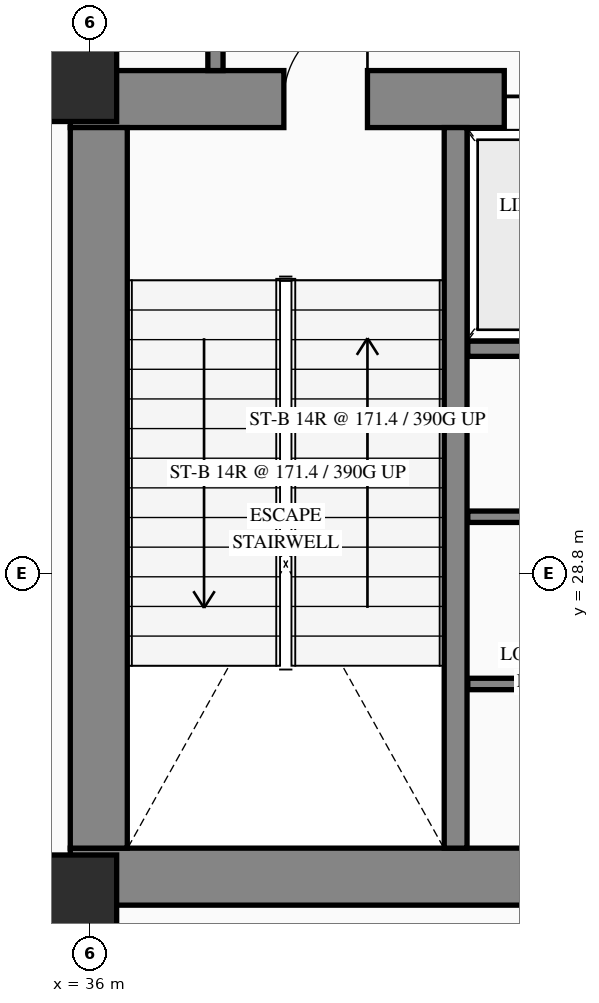
"""IFC4 building model, lengths in metres.
Left out: names, types, materials, properties, quantities, classifications, styles, units other than length and angle.
Written with IfcOpenShell. Run it as: python <this file> out.ifc"""

import sys

from ifc_helpers import new_model, si_unit, direction, frame, frame_2d, origin, origin_2d, place, context, subcontext, project, spatial, rectangle, extrude, element, fill, save


model = new_model("IFC4")
c1 = context("Model", 3, precision=1e-05, world=origin(), true_north=direction((0.0, 1.0)))
c2 = subcontext(c1, "Body", "Model", "MODEL_VIEW")
j1 = project(units=[si_unit("LENGTHUNIT", "METRE"), si_unit("PLANEANGLEUNIT", "RADIAN")], contexts=[c1])
p1 = place(None, origin())
s1 = spatial("IfcSite", under=j1, at=p1, CompositionType="ELEMENT")
p2 = place(p1, origin())
s2 = spatial("IfcBuilding", under=s1, at=p2, CompositionType="ELEMENT")
p3 = place(p2, frame((0.0, 0.0, -4.8)))
s3 = spatial("IfcBuildingStorey", under=s2, at=p3, CompositionType="ELEMENT", Elevation=-4.8)
p4 = place(p3, frame((35.74, 24.815, 0.0), z_axis=(0.0, 0.0, 1.0), x_axis=(1.0, 0.0, 0.0)))
e1 = element("IfcWall", 1, at=p4, inside=s3, PredefinedType="SHEAR", context=c2, shape_type="SweptSolid", body=[
    extrude(rectangle(XDim=8.06, YDim=0.75, at=frame_2d((4.03, 0.0))), origin(), (0.0, 0.0, 1.0), 4.8),
])
p5 = place(p3, frame((35.74, 35.045, 0.0), z_axis=(0.0, 0.0, 1.0), x_axis=(1.0, 0.0, 0.0)))
e2 = element("IfcWall", 2, at=p5, inside=s3, PredefinedType="SHEAR", context=c2, shape_type="SweptSolid", body=[
    extrude(rectangle(XDim=8.06, YDim=0.75, at=frame_2d((4.03, 0.0))), origin(), (0.0, 0.0, 1.0), 4.8),
])
p6 = place(p5, frame((2.81, 0.0, 0.0)))
e3 = element("IfcOpeningElement", 3, at=p6, cuts=e2, PredefinedType="OPENING", context=c2, shape_type="SweptSolid", body=[
    extrude(rectangle(XDim=1.1, YDim=2.2, at=frame_2d((0.55, 1.1))), frame((0.0, 0.385, 0.0), z_axis=(0.0, -1.0, 0.0), x_axis=(1.0, 0.0, 0.0)), (0.0, 0.0, 1.0), 0.77),
])
p7 = place(p5, frame((5.71, 0.0, 0.0)))
e4 = element("IfcOpeningElement", 4, at=p7, cuts=e2, PredefinedType="OPENING", context=c2, shape_type="SweptSolid", body=[
    extrude(rectangle(XDim=1.12, YDim=2.15, at=frame_2d((0.56, 1.075))), frame((0.0, 0.385, 0.0), z_axis=(0.0, -1.0, 0.0), x_axis=(1.0, 0.0, 0.0)), (0.0, 0.0, 1.0), 0.77),
])
p8 = place(p3, frame((36.115, 25.19, 0.0), z_axis=(0.0, 0.0, 1.0), x_axis=(0.0, 1.0, 0.0)))
e5 = element("IfcWall", 5, at=p8, inside=s3, PredefinedType="SHEAR", context=c2, shape_type="SweptSolid", body=[
    extrude(rectangle(XDim=9.48, YDim=0.75, at=frame_2d((4.74, 0.0))), origin(), (0.0, 0.0, 1.0), 4.8),
])
p9 = place(p3, frame((40.81, 25.19, 0.0), z_axis=(0.0, 0.0, 1.0), x_axis=(0.0, 1.0, 0.0)))
e6 = element("IfcWall", 6, at=p9, inside=s3, PredefinedType="SHEAR", context=c2, shape_type="SweptSolid", body=[
    extrude(rectangle(XDim=9.48, YDim=0.3, at=frame_2d((4.74, 0.0))), origin(), (0.0, 0.0, 1.0), 4.8),
])
for number, where, z_axis, x_axis in (
    (7, (35.8, 24.55, 0.0), (0.0, 0.0, 1.0), (1.0, 0.0, 0.0)),
    (8, (35.8, 35.3, 0.0), (0.0, 0.0, 1.0), (1.0, 0.0, 0.0)),
):
    element("IfcColumn", number, at=place(p3, frame(where, z_axis=z_axis, x_axis=x_axis)), inside=s3, PredefinedType="COLUMN", context=c2, shape_type="SweptSolid", body=[
        extrude(rectangle(XDim=1.1, YDim=1.1, at=origin_2d()), origin(), (0.0, 0.0, 1.0), 4.8),
    ])
p10 = place(p3, frame((40.97, 31.76, 0.0), z_axis=(0.0, 0.0, 1.0), x_axis=(1.0, 0.0, 0.0)))
e9 = element("IfcWall", 9, at=p10, inside=s3, PredefinedType="STANDARD", context=c2, shape_type="SweptSolid", body=[
    extrude(rectangle(XDim=2.08, YDim=0.2, at=frame_2d((1.04, 0.0))), origin(), (0.0, 0.0, 1.0), 4.5),
])
for number, where, z_axis, x_axis in (
    (10, (40.97, 27.35, 0.0), (0.0, 0.0, 1.0), (1.0, 0.0, 0.0)),
    (11, (40.97, 29.55, 0.0), (0.0, 0.0, 1.0), (1.0, 0.0, 0.0)),
):
    element("IfcWall", number, at=place(p3, frame(where, z_axis=z_axis, x_axis=x_axis)), inside=s3, PredefinedType="PARTITIONING", context=c2, shape_type="SweptSolid", body=[
        extrude(rectangle(XDim=2.08, YDim=0.15, at=frame_2d((1.04, 0.0))), origin(), (0.0, 0.0, 1.0), 4.5),
    ])
p11 = place(p3, frame((37.65, 35.42, 0.0), z_axis=(0.0, 0.0, 1.0), x_axis=(0.0, 1.0, 0.0)))
e12 = element("IfcWall", 12, at=p11, inside=s3, PredefinedType="STANDARD", context=c2, shape_type="SweptSolid", body=[
    extrude(rectangle(XDim=2.68, YDim=0.2, at=frame_2d((1.34, 0.0))), origin(), (0.0, 0.0, 1.0), 4.5),
])
p12 = place(p11, frame((0.84, 0.0, 0.0)))
e13 = element("IfcOpeningElement", 13, at=p12, cuts=e12, PredefinedType="OPENING", context=c2, shape_type="SweptSolid", body=[
    extrude(rectangle(XDim=1.0, YDim=2.2, at=frame_2d((0.5, 1.1))), frame((0.0, 0.11, 0.0), z_axis=(0.0, -1.0, 0.0), x_axis=(1.0, 0.0, 0.0)), (0.0, 0.0, 1.0), 0.22),
])
p13 = place(p6, origin())
e14 = element("IfcDoor", 14, at=p13, inside=s3, OperationType="SINGLE_SWING_RIGHT", PredefinedType="DOOR", context=c2, shape_type="SweptSolid", body=[
    extrude(rectangle(XDim=1.1, YDim=2.2, at=frame_2d((0.55, 1.1))), frame((0.0, 0.025, 0.0), z_axis=(0.0, -1.0, 0.0), x_axis=(1.0, 0.0, 0.0)), (0.0, 0.0, 1.0), 0.05),
])
fill(e3, e14)
p14 = place(p7, origin())
e15 = element("IfcDoor", 15, at=p14, inside=s3, OperationType="SLIDING_TO_RIGHT", PredefinedType="USERDEFINED", context=c2, shape_type="SweptSolid", body=[
    extrude(rectangle(XDim=1.12, YDim=2.15, at=frame_2d((0.56, 1.075))), frame((0.0, 0.025, 0.0), z_axis=(0.0, -1.0, 0.0), x_axis=(1.0, 0.0, 0.0)), (0.0, 0.0, 1.0), 0.05),
])
fill(e4, e15)
save(model, sys.argv[1])
